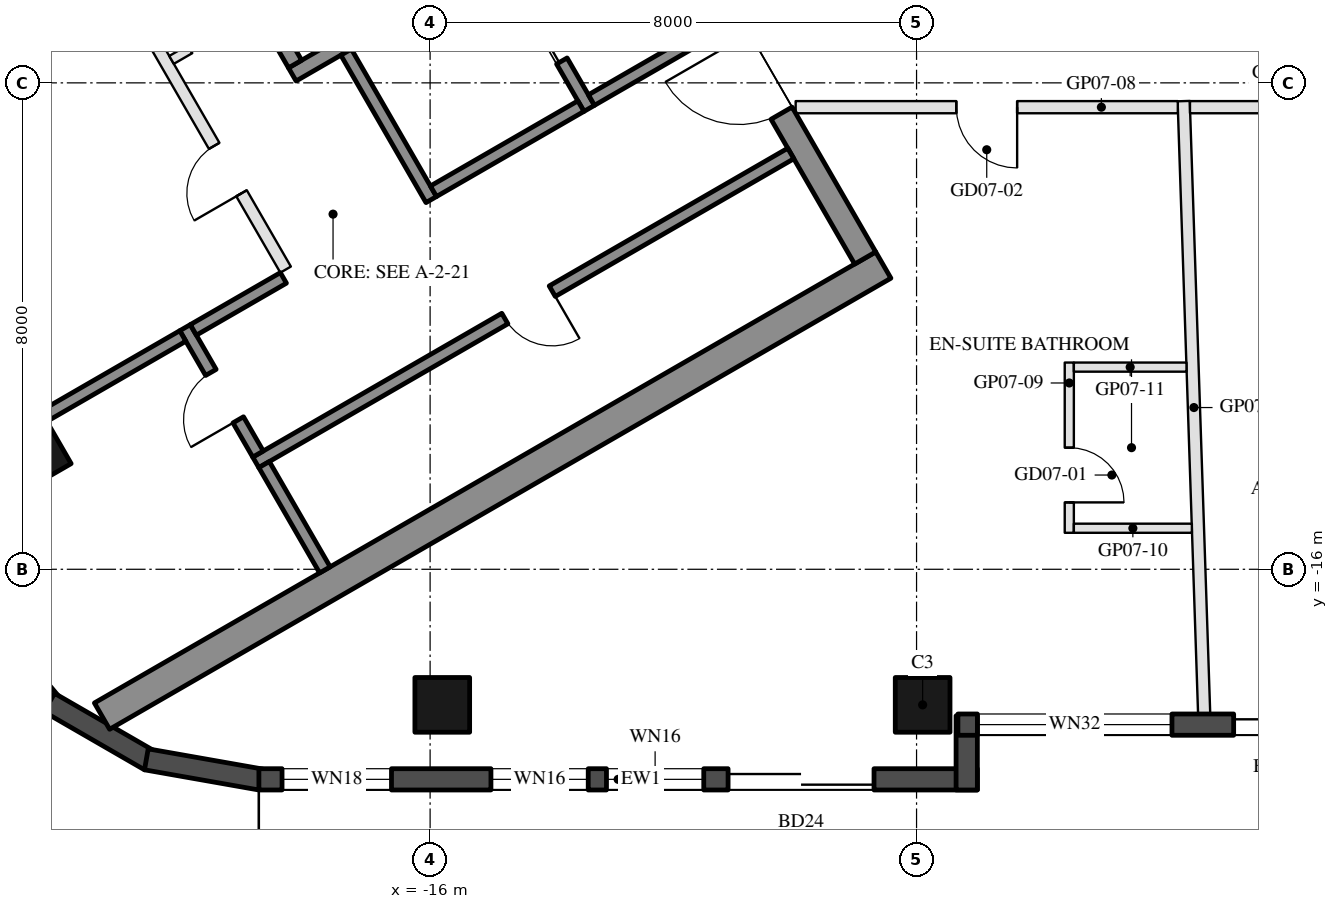
"""IFC4 building model, lengths in metres.
Left out: names, types, materials, properties, quantities, classifications, styles, units other than length and angle.
Written with IfcOpenShell. Run it as: python <this file> out.ifc"""

import sys

from ifc_helpers import new_model, si_unit, direction, frame, frame_2d, origin, origin_2d, place, context, subcontext, project, spatial, rectangle, hollow_rectangle, extrude, element, fill, save


model = new_model("IFC4")
c1 = context("Model", 3, precision=1e-05, world=origin(), true_north=direction((0.0, 1.0)))
c2 = subcontext(c1, "Body", "Model", "MODEL_VIEW")
j1 = project(units=[si_unit("LENGTHUNIT", "METRE"), si_unit("PLANEANGLEUNIT", "RADIAN")], contexts=[c1])
p1 = place(None, origin())
s1 = spatial("IfcSite", under=j1, at=p1, CompositionType="ELEMENT")
p2 = place(p1, origin())
s2 = spatial("IfcBuilding", under=s1, at=p2, CompositionType="ELEMENT")
p3 = place(p2, frame((0.0, 0.0, 98.3)))
s3 = spatial("IfcBuildingStorey", under=s2, at=p3, CompositionType="ELEMENT", Elevation=98.3)
for number, where, z_axis, x_axis in (
    (1, (-15.8, -18.23, 0.0), (0.0, 0.0, 1.0), (-1.0, 0.0, 0.0)),
    (2, (-7.9, -18.23, 0.0), (0.0, 0.0, 1.0), (-1.0, 0.0, 0.0)),
):
    element("IfcColumn", number, at=place(p3, frame(where, z_axis=z_axis, x_axis=x_axis)), inside=s3, PredefinedType="COLUMN", context=c2, shape_type="SweptSolid", body=[
        extrude(hollow_rectangle(XDim=0.9, YDim=0.9, WallThickness=0.04, at=origin_2d()), origin(), (0.0, 0.0, 1.0), 3.7),
    ])
p4 = place(p3, frame((-23.643, -13.65, 0.0), z_axis=(0.0, 0.0, 1.0), x_axis=(-0.5, 0.866025403784, 0.0)))
e3 = element("IfcColumn", 3, at=p4, inside=s3, PredefinedType="COLUMN", context=c2, shape_type="SweptSolid", body=[
    extrude(hollow_rectangle(XDim=2.8, YDim=2.4, WallThickness=0.07, at=origin_2d()), origin(), (0.0, 0.0, 1.0), 3.7),
])
for number, where, z_axis, x_axis in (
    (4, (-23.445, -16.768, 0.0), (0.0, 0.0, 1.0), (0.643, -0.766, 0.0)),
    (5, (-22.264, -18.192, 0.0), (0.0, 0.0, 1.0), (0.866, -0.5, 0.0)),
):
    element("IfcWall", number, at=place(p3, frame(where, z_axis=z_axis, x_axis=x_axis)), inside=s3, PredefinedType="SOLIDWALL", context=c2, shape_type="SweptSolid", body=[
        extrude(rectangle(XDim=1.91, YDim=0.35, at=frame_2d((0.955, 0.0))), origin(), (0.0, 0.0, 1.0), 3.55),
    ])
p5 = place(p3, frame((-20.667, -19.126, 0.0), z_axis=(0.0, 0.0, 1.0), x_axis=(0.984798995425, -0.173697837091, 0.0)))
e6 = element("IfcWall", 6, at=p5, inside=s3, PredefinedType="SOLIDWALL", context=c2, shape_type="SweptSolid", body=[
    extrude(rectangle(XDim=1.91, YDim=0.35, at=frame_2d((0.955, 0.0))), origin(), (0.0, 0.0, 1.0), 3.55),
])
p6 = place(p3, frame((-18.816, -19.455, 0.0), z_axis=(0.0, 0.0, 1.0), x_axis=(1.0, 0.0, 0.0)))
e7 = element("IfcWall", 7, at=p6, inside=s3, PredefinedType="SOLIDWALL", context=c2, shape_type="SweptSolid", body=[
    extrude(rectangle(XDim=11.816, YDim=0.35, at=frame_2d((5.908, 0.0))), origin(), (0.0, 0.0, 1.0), 3.55),
])
p7 = place(p6, frame((0.381, 0.0, 0.3)))
e8 = element("IfcOpeningElement", 8, at=p7, cuts=e7, PredefinedType="OPENING", context=c2, shape_type="SweptSolid", body=[
    extrude(rectangle(XDim=1.8, YDim=2.65, at=frame_2d((0.9, 1.325))), frame((0.0, 0.185, 0.0), z_axis=(0.0, -1.0, 0.0), x_axis=(1.0, 0.0, 0.0)), (0.0, 0.0, 1.0), 0.37),
])
p8 = place(p6, frame((7.716, 0.0, 0.0)))
e9 = element("IfcOpeningElement", 9, at=p8, cuts=e7, PredefinedType="OPENING", context=c2, shape_type="SweptSolid", body=[
    extrude(rectangle(XDim=2.4, YDim=2.4, at=frame_2d((1.2, 1.2))), frame((0.0, 0.185, 0.0), z_axis=(0.0, -1.0, 0.0), x_axis=(1.0, 0.0, 0.0)), (0.0, 0.0, 1.0), 0.37),
])
p9 = place(p6, frame((3.816, 0.0, 0.3)))
e10 = element("IfcOpeningElement", 10, at=p9, cuts=e7, PredefinedType="OPENING", context=c2, shape_type="SweptSolid", body=[
    extrude(rectangle(XDim=1.6, YDim=2.65, at=frame_2d((0.8, 1.325))), frame((0.0, 0.185, 0.0), z_axis=(0.0, -1.0, 0.0), x_axis=(1.0, 0.0, 0.0)), (0.0, 0.0, 1.0), 0.37),
])
p10 = place(p6, frame((5.716, 0.0, 0.3)))
e11 = element("IfcOpeningElement", 11, at=p10, cuts=e7, PredefinedType="OPENING", context=c2, shape_type="SweptSolid", body=[
    extrude(rectangle(XDim=1.6, YDim=2.65, at=frame_2d((0.8, 1.325))), frame((0.0, 0.185, 0.0), z_axis=(0.0, -1.0, 0.0), x_axis=(1.0, 0.0, 0.0)), (0.0, 0.0, 1.0), 0.37),
])
p11 = place(p3, frame((-7.175, -19.63, 0.0), z_axis=(0.0, 0.0, 1.0), x_axis=(0.0, 1.0, 0.0)))
e12 = element("IfcWall", 12, at=p11, inside=s3, PredefinedType="SOLIDWALL", context=c2, shape_type="SweptSolid", body=[
    extrude(rectangle(XDim=1.22, YDim=0.35, at=frame_2d((0.61, 0.0))), origin(), (0.0, 0.0, 1.0), 3.55),
])
p12 = place(p3, frame((-7.32, -18.555, 0.0), z_axis=(0.0, 0.0, 1.0), x_axis=(1.0, 0.0, 0.0)))
e13 = element("IfcWall", 13, at=p12, inside=s3, PredefinedType="SOLIDWALL", context=c2, shape_type="SweptSolid", body=[
    extrude(rectangle(XDim=6.74, YDim=0.35, at=frame_2d((3.37, 0.0))), origin(), (0.0, 0.0, 1.0), 3.55),
])
p13 = place(p12, frame((0.32, 0.0, 0.3)))
e14 = element("IfcOpeningElement", 14, at=p13, cuts=e13, PredefinedType="OPENING", context=c2, shape_type="SweptSolid", body=[
    extrude(rectangle(XDim=3.2, YDim=2.65, at=frame_2d((1.6, 1.325))), frame((0.0, 0.185, 0.0), z_axis=(0.0, -1.0, 0.0), x_axis=(1.0, 0.0, 0.0)), (0.0, 0.0, 1.0), 0.37),
])
p14 = place(p12, frame((4.535, 0.0, 0.0)))
e15 = element("IfcOpeningElement", 15, at=p14, cuts=e13, PredefinedType="OPENING", context=c2, shape_type="SweptSolid", body=[
    extrude(rectangle(XDim=1.4, YDim=2.4, at=frame_2d((0.7, 1.2))), frame((0.0, 0.185, 0.0), z_axis=(0.0, -1.0, 0.0), x_axis=(1.0, 0.0, 0.0)), (0.0, 0.0, 1.0), 0.37),
])
for number, where, z_axis, x_axis in (
    (16, (-13.797, -1.903, 0.0), (0.0, 0.0, 1.0), (-0.866, -0.5, 0.0)),
    (17, (-8.547, -10.997, 0.0), (0.0, 0.0, 1.0), (-0.866, -0.5, 0.0)),
):
    element("IfcWall", number, at=place(p3, frame(where, z_axis=z_axis, x_axis=x_axis)), inside=s3, PredefinedType="SHEAR", context=c2, shape_type="SweptSolid", body=[
        extrude(rectangle(XDim=14.837, YDim=0.5, at=frame_2d((7.418, 0.0))), origin(), (0.0, 0.0, 1.0), 3.5),
    ])
p15 = place(p3, frame((-13.845, -2.22, 0.0), z_axis=(0.0, 0.0, 1.0), x_axis=(0.500004234368, -0.866022959057, 0.0)))
e18 = element("IfcWall", 18, at=p15, inside=s3, PredefinedType="SHEAR", context=c2, shape_type="SweptSolid", body=[
    extrude(rectangle(XDim=10.0, YDim=0.4, at=frame_2d((5.0, 0.0))), origin(), (0.0, 0.0, 1.0), 3.5),
])
p16 = place(p15, frame((3.55, 0.0, 0.0)))
e19 = element("IfcOpeningElement", 19, at=p16, cuts=e18, PredefinedType="OPENING", context=c2, shape_type="SweptSolid", body=[
    extrude(rectangle(XDim=1.1, YDim=2.1, at=frame_2d((0.55, 1.05))), frame((0.0, 0.21, 0.0), z_axis=(0.0, -1.0, 0.0), x_axis=(1.0, 0.0, 0.0)), (0.0, 0.0, 1.0), 0.42),
])
p17 = place(p15, frame((5.85, 0.0, 0.0)))
e20 = element("IfcOpeningElement", 20, at=p17, cuts=e18, PredefinedType="OPENING", context=c2, shape_type="SweptSolid", body=[
    extrude(rectangle(XDim=1.4, YDim=2.1, at=frame_2d((0.7, 1.05))), frame((0.0, 0.21, 0.0), z_axis=(0.0, -1.0, 0.0), x_axis=(1.0, 0.0, 0.0)), (0.0, 0.0, 1.0), 0.42),
])
p18 = place(p3, frame((-12.681, -4.636, 0.0), z_axis=(0.0, 0.0, 1.0), x_axis=(-0.866021702275, -0.500006411147, 0.0)))
e21 = element("IfcWall", 21, at=p18, inside=s3, PredefinedType="SHEAR", context=c2, shape_type="SweptSolid", body=[
    extrude(rectangle(XDim=6.45, YDim=0.25, at=frame_2d((3.225, 0.0))), origin(), (0.0, 0.0, 1.0), 3.5),
])
p19 = place(p18, frame((0.3, 0.0, 0.0)))
e22 = element("IfcOpeningElement", 22, at=p19, cuts=e21, PredefinedType="OPENING", context=c2, shape_type="SweptSolid", body=[
    extrude(rectangle(XDim=1.0, YDim=2.1, at=frame_2d((0.5, 1.05))), frame((0.0, 0.135, 0.0), z_axis=(0.0, -1.0, 0.0), x_axis=(1.0, 0.0, 0.0)), (0.0, 0.0, 1.0), 0.27),
])
p20 = place(p3, frame((-19.496, -5.482, 0.0), z_axis=(0.0, 0.0, 1.0), x_axis=(0.499990435942, -0.866030925526, 0.0)))
e23 = element("IfcWall", 23, at=p20, inside=s3, PredefinedType="SHEAR", context=c2, shape_type="SweptSolid", body=[
    extrude(rectangle(XDim=2.55, YDim=0.25, at=frame_2d((1.275, 0.0))), origin(), (0.0, 0.0, 1.0), 3.5),
])
p21 = place(p3, frame((-17.381, -7.495, 0.0), z_axis=(0.0, 0.0, 1.0), x_axis=(0.500011755427, -0.866018616679, 0.0)))
e24 = element("IfcWall", 24, at=p21, inside=s3, PredefinedType="SHEAR", context=c2, shape_type="SweptSolid", body=[
    extrude(rectangle(XDim=2.8, YDim=0.2, at=frame_2d((1.4, 0.0))), origin(), (0.0, 0.0, 1.0), 3.5),
])
p22 = place(p3, frame((-14.783, -5.995, 0.0), z_axis=(0.0, 0.0, 1.0), x_axis=(0.49994636267, -0.866056369097, 0.0)))
e25 = element("IfcWall", 25, at=p22, inside=s3, PredefinedType="SHEAR", context=c2, shape_type="SweptSolid", body=[
    extrude(rectangle(XDim=2.8, YDim=0.2, at=frame_2d((1.4, 0.0))), origin(), (0.0, 0.0, 1.0), 3.5),
])
p23 = place(p22, frame((0.7, 0.0, 0.0)))
e26 = element("IfcOpeningElement", 26, at=p23, cuts=e25, PredefinedType="OPENING", context=c2, shape_type="SweptSolid", body=[
    extrude(rectangle(XDim=1.2, YDim=2.1, at=frame_2d((0.6, 1.05))), frame((0.0, 0.11, 0.0), z_axis=(0.0, -1.0, 0.0), x_axis=(1.0, 0.0, 0.0)), (0.0, 0.0, 1.0), 0.22),
])
p24 = place(p3, frame((-13.52, -8.383, 0.0), z_axis=(0.0, 0.0, 1.0), x_axis=(-0.866034573852, -0.49998411664, 0.0)))
e27 = element("IfcWall", 27, at=p24, inside=s3, PredefinedType="SHEAR", context=c2, shape_type="SweptSolid", body=[
    extrude(rectangle(XDim=2.8, YDim=0.2, at=frame_2d((1.4, 0.0))), origin(), (0.0, 0.0, 1.0), 3.5),
])
p25 = place(p3, frame((-11.268, -7.083, 0.0), z_axis=(0.0, 0.0, 1.0), x_axis=(-0.866050077142, -0.499957262057, 0.0)))
e28 = element("IfcWall", 28, at=p25, inside=s3, PredefinedType="SHEAR", context=c2, shape_type="SweptSolid", body=[
    extrude(rectangle(XDim=2.4, YDim=0.2, at=frame_2d((1.2, 0.0))), origin(), (0.0, 0.0, 1.0), 3.5),
])
p26 = place(p3, frame((-10.068, -9.162, 0.0), z_axis=(0.0, 0.0, 1.0), x_axis=(-0.866032725843, -0.499987317609, 0.0)))
e29 = element("IfcWall", 29, at=p26, inside=s3, PredefinedType="SHEAR", context=c2, shape_type="SweptSolid", body=[
    extrude(rectangle(XDim=10.16, YDim=0.2, at=frame_2d((5.08, 0.0))), origin(), (0.0, 0.0, 1.0), 3.5),
])
p27 = place(p26, frame((4.53, 0.0, 0.0)))
e30 = element("IfcOpeningElement", 30, at=p27, cuts=e29, PredefinedType="OPENING", context=c2, shape_type="SweptSolid", body=[
    extrude(rectangle(XDim=0.9, YDim=2.1, at=frame_2d((0.45, 1.05))), frame((0.0, 0.11, 0.0), z_axis=(0.0, -1.0, 0.0), x_axis=(1.0, 0.0, 0.0)), (0.0, 0.0, 1.0), 0.22),
])
p28 = place(p3, frame((-20.031, -12.026, 0.0), z_axis=(0.0, 0.0, 1.0), x_axis=(0.500033551112, -0.866006032174, 0.0)))
e31 = element("IfcWall", 31, at=p28, inside=s3, PredefinedType="SHEAR", context=c2, shape_type="SweptSolid", body=[
    extrude(rectangle(XDim=2.4, YDim=0.2, at=frame_2d((1.2, 0.0))), origin(), (0.0, 0.0, 1.0), 3.5),
])
p29 = place(p28, frame((0.85, 0.0, 0.0)))
e32 = element("IfcOpeningElement", 32, at=p29, cuts=e31, PredefinedType="OPENING", context=c2, shape_type="SweptSolid", body=[
    extrude(rectangle(XDim=0.9, YDim=2.1, at=frame_2d((0.45, 1.05))), frame((0.0, 0.11, 0.0), z_axis=(0.0, -1.0, 0.0), x_axis=(1.0, 0.0, 0.0)), (0.0, 0.0, 1.0), 0.22),
])
p30 = place(p3, frame((-18.413, -11.208, 0.0), z_axis=(0.0, 0.0, 1.0), x_axis=(-0.866038183914, -0.499977863513, 0.0)))
e33 = element("IfcWall", 33, at=p30, inside=s3, PredefinedType="SHEAR", context=c2, shape_type="SweptSolid", body=[
    extrude(rectangle(XDim=1.71, YDim=0.2, at=frame_2d((0.855, 0.0))), origin(), (0.0, 0.0, 1.0), 3.5),
])
p31 = place(p3, frame((-18.73, -14.278, 0.0), z_axis=(0.0, 0.0, 1.0), x_axis=(0.50002537861, -0.866010750942, 0.0)))
e34 = element("IfcWall", 34, at=p31, inside=s3, PredefinedType="SHEAR", context=c2, shape_type="SweptSolid", body=[
    extrude(rectangle(XDim=2.0, YDim=0.2, at=frame_2d((1.0, 0.0))), origin(), (0.0, 0.0, 1.0), 3.5),
])
p32 = place(p3, frame((-20.067, -12.163, 0.0), z_axis=(0.0, 0.0, 1.0), x_axis=(-0.866060851709, -0.499938597367, 0.0)))
e35 = element("IfcWall", 35, at=p32, inside=s3, PredefinedType="SHEAR", context=c2, shape_type="SweptSolid", body=[
    extrude(rectangle(XDim=2.64, YDim=0.2, at=frame_2d((1.32, 0.0))), origin(), (0.0, 0.0, 1.0), 3.5),
])
p33 = place(p3, frame((-21.076, -6.395, 0.0), z_axis=(0.0, 0.0, 1.0), x_axis=(0.50001468107, -0.866016927499, 0.0)))
e36 = element("IfcWall", 36, at=p33, inside=s3, PredefinedType="PARTITIONING", context=c2, shape_type="SweptSolid", body=[
    extrude(rectangle(XDim=5.4, YDim=0.2, at=frame_2d((2.7, 0.0))), origin(), (0.0, 0.0, 1.0), 3.5),
])
p34 = place(p33, frame((3.05, 0.0, 0.0)))
e37 = element("IfcOpeningElement", 37, at=p34, cuts=e36, PredefinedType="OPENING", context=c2, shape_type="SweptSolid", body=[
    extrude(rectangle(XDim=0.9, YDim=2.1, at=frame_2d((0.45, 1.05))), frame((0.0, 0.11, 0.0), z_axis=(0.0, -1.0, 0.0), x_axis=(1.0, 0.0, 0.0)), (0.0, 0.0, 1.0), 0.22),
])
p35 = place(p3, frame((-18.866, -6.822, 0.0), z_axis=(0.0, 0.0, 1.0), x_axis=(-0.866028054938, -0.499995408039, 0.0)))
e38 = element("IfcWall", 38, at=p35, inside=s3, PredefinedType="PARTITIONING", context=c2, shape_type="SweptSolid", body=[
    extrude(rectangle(XDim=1.6, YDim=0.15, at=frame_2d((0.8, 0.0))), origin(), (0.0, 0.0, 1.0), 3.5),
])
p36 = place(p35, frame((0.35, 0.0, 0.0)))
e39 = element("IfcOpeningElement", 39, at=p36, cuts=e38, PredefinedType="OPENING", context=c2, shape_type="SweptSolid", body=[
    extrude(rectangle(XDim=0.9, YDim=2.1, at=frame_2d((0.45, 1.05))), frame((0.0, 0.085, 0.0), z_axis=(0.0, -1.0, 0.0), x_axis=(1.0, 0.0, 0.0)), (0.0, 0.0, 1.0), 0.17),
])
p37 = place(p3, frame((-3.27, -18.38, 0.0), z_axis=(0.0, 0.0, 1.0), x_axis=(-0.03338172908, 0.999442674776, 0.0)))
e40 = element("IfcWall", 40, at=p37, inside=s3, PredefinedType="PARTITIONING", context=c2, shape_type="SweptSolid", body=[
    extrude(rectangle(XDim=10.085, YDim=0.2, at=frame_2d((5.043, 0.0))), origin(), (0.0, 0.0, 1.0), 2.96),
])
p38 = place(p3, frame((-3.703, -8.4, 0.0), z_axis=(0.0, 0.0, 1.0), x_axis=(-1.0, 0.0, 0.0)))
e41 = element("IfcWall", 41, at=p38, inside=s3, PredefinedType="PARTITIONING", context=c2, shape_type="SweptSolid", body=[
    extrude(rectangle(XDim=6.285, YDim=0.2, at=frame_2d((3.143, 0.0))), origin(), (0.0, 0.0, 1.0), 2.95),
])
p39 = place(p38, frame((2.642, 0.0, 0.0)))
e42 = element("IfcOpeningElement", 42, at=p39, cuts=e41, PredefinedType="OPENING", context=c2, shape_type="SweptSolid", body=[
    extrude(rectangle(XDim=1.0, YDim=2.1, at=frame_2d((0.5, 1.05))), frame((0.0, 0.11, 0.0), z_axis=(0.0, -1.0, 0.0), x_axis=(1.0, 0.0, 0.0)), (0.0, 0.0, 1.0), 0.22),
])
p40 = place(p3, frame((-5.488, -12.6, 0.0), z_axis=(0.0, 0.0, 1.0), x_axis=(0.0, -1.0, 0.0)))
e43 = element("IfcWall", 43, at=p40, inside=s3, PredefinedType="PARTITIONING", context=c2, shape_type="SweptSolid", body=[
    extrude(rectangle(XDim=2.8, YDim=0.15, at=frame_2d((1.4, 0.0))), origin(), (0.0, 0.0, 1.0), 3.55),
])
p41 = place(p40, frame((1.4, 0.0, 0.0)))
e44 = element("IfcOpeningElement", 44, at=p41, cuts=e43, PredefinedType="OPENING", context=c2, shape_type="SweptSolid", body=[
    extrude(rectangle(XDim=0.9, YDim=2.1, at=frame_2d((0.45, 1.05))), frame((0.0, 0.085, 0.0), z_axis=(0.0, -1.0, 0.0), x_axis=(1.0, 0.0, 0.0)), (0.0, 0.0, 1.0), 0.17),
])
p42 = place(p3, frame((-5.413, -15.325, 0.0), z_axis=(0.0, 0.0, 1.0), x_axis=(1.0, 0.0, 0.0)))
e45 = element("IfcWall", 45, at=p42, inside=s3, PredefinedType="PARTITIONING", context=c2, shape_type="SweptSolid", body=[
    extrude(rectangle(XDim=1.941, YDim=0.15, at=frame_2d((0.97, 0.0))), origin(), (0.0, 0.0, 1.0), 2.95),
])
p43 = place(p3, frame((-5.413, -12.675, 0.0), z_axis=(0.0, 0.0, 1.0), x_axis=(1.0, 0.0, 0.0)))
e46 = element("IfcWall", 46, at=p43, inside=s3, PredefinedType="PARTITIONING", context=c2, shape_type="SweptSolid", body=[
    extrude(rectangle(XDim=1.853, YDim=0.15, at=frame_2d((0.926, 0.0))), origin(), (0.0, 0.0, 1.0), 2.95),
])
p44 = place(p3, frame((2.3, -8.4, 0.0), z_axis=(0.0, 0.0, 1.0), x_axis=(-1.0, 0.0, 0.0)))
e47 = element("IfcWall", 47, at=p44, inside=s3, PredefinedType="PARTITIONING", context=c2, shape_type="SweptSolid", body=[
    extrude(rectangle(XDim=5.803, YDim=0.2, at=frame_2d((2.902, 0.0))), origin(), (0.0, 0.0, 1.0), 2.95),
])
p45 = place(p44, frame((3.45, 0.0, 0.0)))
e48 = element("IfcOpeningElement", 48, at=p45, cuts=e47, PredefinedType="OPENING", context=c2, shape_type="SweptSolid", body=[
    extrude(rectangle(XDim=1.0, YDim=2.1, at=frame_2d((0.5, 1.05))), frame((0.0, 0.11, 0.0), z_axis=(0.0, -1.0, 0.0), x_axis=(1.0, 0.0, 0.0)), (0.0, 0.0, 1.0), 0.22),
])
p46 = place(p7, origin())
e49 = element("IfcWindow", 49, at=p46, inside=s3, PartitioningType="SINGLE_PANEL", PredefinedType="WINDOW", context=c2, shape_type="SweptSolid", body=[
    extrude(rectangle(XDim=1.8, YDim=2.65, at=frame_2d((0.9, 1.325))), frame((0.0, 0.03, 0.0), z_axis=(0.0, -1.0, 0.0), x_axis=(1.0, 0.0, 0.0)), (0.0, 0.0, 1.0), 0.06),
])
fill(e8, e49)
p47 = place(p8, frame((2.4, 0.0, 0.0), z_axis=(0.0, 0.0, 1.0), x_axis=(-1.0, 0.0, 0.0)))
e50 = element("IfcDoor", 50, at=p47, inside=s3, OperationType="SLIDING_TO_LEFT", PredefinedType="DOOR", context=c2, shape_type="SweptSolid", body=[
    extrude(rectangle(XDim=2.4, YDim=2.4, at=frame_2d((1.2, 1.2))), frame((0.0, 0.025, 0.0), z_axis=(0.0, -1.0, 0.0), x_axis=(1.0, 0.0, 0.0)), (0.0, 0.0, 1.0), 0.05),
])
fill(e9, e50)
p48 = place(p9, origin())
e51 = element("IfcWindow", 51, at=p48, inside=s3, PartitioningType="SINGLE_PANEL", PredefinedType="WINDOW", context=c2, shape_type="SweptSolid", body=[
    extrude(rectangle(XDim=1.6, YDim=2.65, at=frame_2d((0.8, 1.325))), frame((0.0, 0.03, 0.0), z_axis=(0.0, -1.0, 0.0), x_axis=(1.0, 0.0, 0.0)), (0.0, 0.0, 1.0), 0.06),
])
fill(e10, e51)
p49 = place(p10, origin())
e52 = element("IfcWindow", 52, at=p49, inside=s3, PartitioningType="SINGLE_PANEL", PredefinedType="WINDOW", context=c2, shape_type="SweptSolid", body=[
    extrude(rectangle(XDim=1.6, YDim=2.65, at=frame_2d((0.8, 1.325))), frame((0.0, 0.03, 0.0), z_axis=(0.0, -1.0, 0.0), x_axis=(1.0, 0.0, 0.0)), (0.0, 0.0, 1.0), 0.06),
])
fill(e11, e52)
p50 = place(p13, origin())
e53 = element("IfcWindow", 53, at=p50, inside=s3, PartitioningType="SINGLE_PANEL", PredefinedType="WINDOW", context=c2, shape_type="SweptSolid", body=[
    extrude(rectangle(XDim=3.2, YDim=2.65, at=frame_2d((1.6, 1.325))), frame((0.0, 0.03, 0.0), z_axis=(0.0, -1.0, 0.0), x_axis=(1.0, 0.0, 0.0)), (0.0, 0.0, 1.0), 0.06),
])
fill(e14, e53)
p51 = place(p14, frame((1.4, 0.0, 0.0), z_axis=(0.0, 0.0, 1.0), x_axis=(-1.0, 0.0, 0.0)))
e54 = element("IfcDoor", 54, at=p51, inside=s3, OperationType="SLIDING_TO_LEFT", PredefinedType="DOOR", context=c2, shape_type="SweptSolid", body=[
    extrude(rectangle(XDim=1.4, YDim=2.4, at=frame_2d((0.7, 1.2))), frame((0.0, 0.025, 0.0), z_axis=(0.0, -1.0, 0.0), x_axis=(1.0, 0.0, 0.0)), (0.0, 0.0, 1.0), 0.05),
])
fill(e15, e54)
p52 = place(p23, origin())
e55 = element("IfcDoor", 55, at=p52, inside=s3, OperationType="DOUBLE_DOOR_SLIDING", PredefinedType="DOOR", context=c2, shape_type="SweptSolid", body=[
    extrude(rectangle(XDim=1.2, YDim=2.1, at=frame_2d((0.6, 1.05))), frame((0.0, 0.025, 0.0), z_axis=(0.0, -1.0, 0.0), x_axis=(1.0, 0.0, 0.0)), (0.0, 0.0, 1.0), 0.05),
])
fill(e26, e55)
p53 = place(p27, origin())
e56 = element("IfcDoor", 56, at=p53, inside=s3, OperationType="SINGLE_SWING_LEFT", PredefinedType="DOOR", context=c2, shape_type="SweptSolid", body=[
    extrude(rectangle(XDim=0.9, YDim=2.1, at=frame_2d((0.45, 1.05))), frame((0.0, 0.025, 0.0), z_axis=(0.0, -1.0, 0.0), x_axis=(1.0, 0.0, 0.0)), (0.0, 0.0, 1.0), 0.05),
])
fill(e30, e56)
p54 = place(p29, frame((0.9, 0.0, 0.0), z_axis=(0.0, 0.0, 1.0), x_axis=(-1.0, 0.0, 0.0)))
e57 = element("IfcDoor", 57, at=p54, inside=s3, OperationType="SINGLE_SWING_LEFT", PredefinedType="DOOR", context=c2, shape_type="SweptSolid", body=[
    extrude(rectangle(XDim=0.9, YDim=2.1, at=frame_2d((0.45, 1.05))), frame((0.0, 0.025, 0.0), z_axis=(0.0, -1.0, 0.0), x_axis=(1.0, 0.0, 0.0)), (0.0, 0.0, 1.0), 0.05),
])
fill(e32, e57)
p55 = place(p34, frame((0.9, 0.0, 0.0), z_axis=(0.0, 0.0, 1.0), x_axis=(-1.0, 0.0, 0.0)))
e58 = element("IfcDoor", 58, at=p55, inside=s3, OperationType="SINGLE_SWING_LEFT", PredefinedType="DOOR", context=c2, shape_type="SweptSolid", body=[
    extrude(rectangle(XDim=0.9, YDim=2.1, at=frame_2d((0.45, 1.05))), frame((0.0, 0.025, 0.0), z_axis=(0.0, -1.0, 0.0), x_axis=(1.0, 0.0, 0.0)), (0.0, 0.0, 1.0), 0.05),
])
fill(e37, e58)
p56 = place(p17, frame((1.4, 0.0, 0.0), z_axis=(0.0, 0.0, 1.0), x_axis=(-1.0, 0.0, 0.0)))
e59 = element("IfcDoor", 59, at=p56, inside=s3, OperationType="DOUBLE_DOOR_SINGLE_SWING", PredefinedType="DOOR", context=c2, shape_type="SweptSolid", body=[
    extrude(rectangle(XDim=1.4, YDim=2.1, at=frame_2d((0.7, 1.05))), frame((0.0, 0.025, 0.0), z_axis=(0.0, -1.0, 0.0), x_axis=(1.0, 0.0, 0.0)), (0.0, 0.0, 1.0), 0.05),
])
fill(e20, e59)
p57 = place(p41, origin())
e60 = element("IfcDoor", 60, at=p57, inside=s3, OperationType="SINGLE_SWING_RIGHT", PredefinedType="DOOR", context=c2, shape_type="SweptSolid", body=[
    extrude(rectangle(XDim=0.9, YDim=2.1, at=frame_2d((0.45, 1.05))), frame((0.0, 0.025, 0.0), z_axis=(0.0, -1.0, 0.0), x_axis=(1.0, 0.0, 0.0)), (0.0, 0.0, 1.0), 0.05),
])
fill(e44, e60)
p58 = place(p39, origin())
e61 = element("IfcDoor", 61, at=p58, inside=s3, OperationType="SINGLE_SWING_LEFT", PredefinedType="DOOR", context=c2, shape_type="SweptSolid", body=[
    extrude(rectangle(XDim=1.0, YDim=2.1, at=frame_2d((0.5, 1.05))), frame((0.0, 0.025, 0.0), z_axis=(0.0, -1.0, 0.0), x_axis=(1.0, 0.0, 0.0)), (0.0, 0.0, 1.0), 0.05),
])
fill(e42, e61)
save(model, sys.argv[1])
